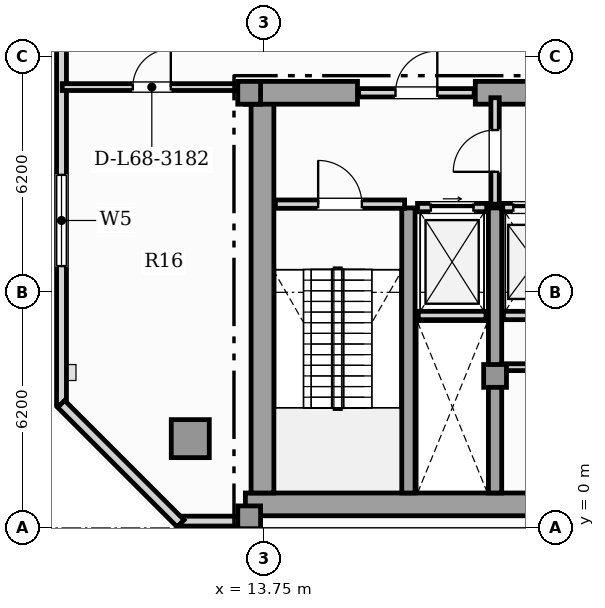
"""IFC4 building model, lengths in metres.
Left out: names, types, materials, properties, quantities, classifications, styles, units other than length and angle.
Written with IfcOpenShell. Run it as: python <this file> out.ifc"""

import sys

from ifc_helpers import new_model, si_unit, direction, frame, frame_2d, origin, origin_2d, place, context, subcontext, project, spatial, rectangle, hollow_rectangle, extrude, element, fill, save


model = new_model("IFC4")
c1 = context("Model", 3, precision=1e-05, world=origin(), true_north=direction((0.0, 1.0)))
c2 = subcontext(c1, "Body", "Model", "MODEL_VIEW")
j1 = project(units=[si_unit("LENGTHUNIT", "METRE"), si_unit("PLANEANGLEUNIT", "RADIAN")], contexts=[c1])
p1 = place(None, origin())
s1 = spatial("IfcSite", under=j1, at=p1, CompositionType="ELEMENT")
p2 = place(p1, origin())
s2 = spatial("IfcBuilding", under=s1, at=p2, CompositionType="ELEMENT")
p3 = place(p2, frame((0.0, 0.0, 276.0)))
s3 = spatial("IfcBuildingStorey", under=s2, at=p3, CompositionType="ELEMENT", Elevation=276.0)
p4 = place(p3, frame((13.25, 0.62, 0.0), z_axis=(0.0, 0.0, 1.0), x_axis=(1.0, 0.0, 0.0)))
e1 = element("IfcWall", 1, at=p4, inside=s3, PredefinedType="SHEAR", context=c2, shape_type="SweptSolid", body=[
    extrude(rectangle(XDim=31.0, YDim=0.6, at=frame_2d((15.5, 0.0))), origin(), (0.0, 0.0, 1.0), 4.85),
])
p5 = place(p3, frame((13.7, 0.92, 0.0), z_axis=(0.0, 0.0, 1.0), x_axis=(0.0, 1.0, 0.0)))
e2 = element("IfcWall", 2, at=p5, inside=s3, PredefinedType="SHEAR", context=c2, shape_type="SweptSolid", body=[
    extrude(rectangle(XDim=10.53, YDim=0.6, at=frame_2d((5.265, 0.0))), origin(), (0.0, 0.0, 1.0), 4.85),
])
p6 = place(p3, frame((13.25, 11.45, 0.0), z_axis=(0.0, 0.0, 1.0), x_axis=(1.0, 0.0, 0.0)))
e3 = element("IfcWall", 3, at=p6, inside=s3, PredefinedType="SHEAR", context=c2, shape_type="SweptSolid", body=[
    extrude(rectangle(XDim=2.95, YDim=0.6, at=frame_2d((1.475, 0.0))), origin(), (0.0, 0.0, 1.0), 4.85),
])
p7 = place(p3, frame((19.3, 11.45, 0.0), z_axis=(0.0, 0.0, 1.0), x_axis=(1.0, 0.0, 0.0)))
e4 = element("IfcWall", 4, at=p7, inside=s3, PredefinedType="SHEAR", context=c2, shape_type="SweptSolid", body=[
    extrude(rectangle(XDim=7.3, YDim=0.6, at=frame_2d((3.65, 0.0))), origin(), (0.0, 0.0, 1.0), 4.85),
])
for number, where, z_axis, x_axis in (
    (5, (17.54, 0.92, 0.0), (0.0, 0.0, 1.0), (0.0, 1.0, 0.0)),
    (6, (19.82, 0.92, 0.0), (0.0, 0.0, 1.0), (0.0, 1.0, 0.0)),
):
    element("IfcWall", number, at=place(p3, frame(where, z_axis=z_axis, x_axis=x_axis)), inside=s3, PredefinedType="SHEAR", context=c2, shape_type="SweptSolid", body=[
        extrude(rectangle(XDim=7.5, YDim=0.35, at=frame_2d((3.75, 0.0))), origin(), (0.0, 0.0, 1.0), 4.85),
    ])
for number, where, z_axis, x_axis in (
    (7, (13.35, 0.28, 0.0), (0.0, 0.0, 1.0), (1.0, 0.0, 0.0)),
    (8, (13.35, 11.45, 0.0), (0.0, 0.0, 1.0), (1.0, 0.0, 0.0)),
    (9, (19.82, 4.0, 0.0), (0.0, 0.0, 1.0), (1.0, 0.0, 0.0)),
):
    element("IfcColumn", number, at=place(p3, frame(where, z_axis=z_axis, x_axis=x_axis)), inside=s3, PredefinedType="COLUMN", context=c2, shape_type="SweptSolid", body=[
        extrude(rectangle(XDim=0.6, YDim=0.6, at=origin_2d()), origin(), (0.0, 0.0, 1.0), 5.05),
    ])
p8 = place(p3, frame((11.8, 2.35, 0.0), z_axis=(0.0, 0.0, 1.0), x_axis=(1.0, 0.0, 0.0)))
e10 = element("IfcColumn", 10, at=p8, inside=s3, PredefinedType="USERDEFINED", context=c2, shape_type="SweptSolid", body=[
    extrude(hollow_rectangle(XDim=1.0, YDim=1.0, WallThickness=0.06, at=origin_2d()), origin(), (0.0, 0.0, 1.0), 5.05),
])
p9 = place(p3, frame((11.522, 0.18, 0.0), z_axis=(0.0, 0.0, 1.0), x_axis=(1.0, 0.0, 0.0)))
e11 = element("IfcWall", 11, at=p9, inside=s3, PredefinedType="SOLIDWALL", context=c2, shape_type="SweptSolid", body=[
    extrude(rectangle(XDim=1.728, YDim=0.26, at=frame_2d((0.864, 0.0))), origin(), (0.0, 0.0, 1.0), 4.85),
])
p10 = place(p3, frame((8.412, 18.529, 0.0), z_axis=(0.0, 0.0, 1.0), x_axis=(0.0, -1.0, 0.0)))
e12 = element("IfcWall", 12, at=p10, inside=s3, PredefinedType="SOLIDWALL", context=c2, shape_type="SweptSolid", body=[
    extrude(rectangle(XDim=15.289, YDim=0.26, at=frame_2d((7.645, 0.0))), origin(), (0.0, 0.0, 1.0), 4.85),
])
p11 = place(p10, frame((9.239, 0.0, 0.85)))
e13 = element("IfcOpeningElement", 13, at=p11, cuts=e12, PredefinedType="OPENING", context=c2, shape_type="SweptSolid", body=[
    extrude(rectangle(XDim=2.4, YDim=2.0, at=frame_2d((1.2, 1.0))), frame((0.0, 0.14, 0.0), z_axis=(0.0, -1.0, 0.0), x_axis=(1.0, 0.0, 0.0)), (0.0, 0.0, 1.0), 0.28),
])
p12 = place(p3, frame((8.402, 3.264, 0.0), z_axis=(0.0, 0.0, 1.0), x_axis=(0.707106781187, -0.707106781187, 0.0)))
e14 = element("IfcWall", 14, at=p12, inside=s3, PredefinedType="SOLIDWALL", context=c2, shape_type="SweptSolid", body=[
    extrude(rectangle(XDim=4.446, YDim=0.26, at=frame_2d((2.223, 0.0))), origin(), (0.0, 0.0, 1.0), 4.85),
])
p13 = place(p3, frame((17.8, 5.59, 0.0), z_axis=(0.0, 0.0, 1.0), x_axis=(1.0, 0.0, 0.0)))
e15 = element("IfcWall", 15, at=p13, inside=s3, PredefinedType="SOLIDWALL", context=c2, shape_type="SweptSolid", body=[
    extrude(rectangle(XDim=1.78, YDim=0.22, at=frame_2d((0.89, 0.0))), origin(), (0.0, 0.0, 1.0), 4.85),
])
p14 = place(p3, frame((17.78, 8.43, 0.0), z_axis=(0.0, 0.0, 1.0), x_axis=(1.0, 0.0, 0.0)))
e16 = element("IfcWall", 16, at=p14, inside=s3, PredefinedType="SOLIDWALL", context=c2, shape_type="SweptSolid", body=[
    extrude(rectangle(XDim=1.82, YDim=0.22, at=frame_2d((0.91, 0.0))), origin(), (0.0, 0.0, 1.0), 4.85),
])
p15 = place(p14, frame((0.35, 0.0, 0.0)))
e17 = element("IfcOpeningElement", 17, at=p15, cuts=e16, PredefinedType="OPENING", context=c2, shape_type="SweptSolid", body=[
    extrude(rectangle(XDim=1.12, YDim=2.25, at=frame_2d((0.56, 1.125))), frame((0.0, 0.12, 0.0), z_axis=(0.0, -1.0, 0.0), x_axis=(1.0, 0.0, 0.0)), (0.0, 0.0, 1.0), 0.24),
])
p16 = place(p3, frame((20.04, 5.59, 0.0), z_axis=(0.0, 0.0, 1.0), x_axis=(1.0, 0.0, 0.0)))
e18 = element("IfcWall", 18, at=p16, inside=s3, PredefinedType="SOLIDWALL", context=c2, shape_type="SweptSolid", body=[
    extrude(rectangle(XDim=1.7, YDim=0.22, at=frame_2d((0.85, 0.0))), origin(), (0.0, 0.0, 1.0), 4.85),
])
p17 = place(p3, frame((20.02, 8.43, 0.0), z_axis=(0.0, 0.0, 1.0), x_axis=(1.0, 0.0, 0.0)))
e19 = element("IfcWall", 19, at=p17, inside=s3, PredefinedType="SOLIDWALL", context=c2, shape_type="SweptSolid", body=[
    extrude(rectangle(XDim=1.74, YDim=0.22, at=frame_2d((0.87, 0.0))), origin(), (0.0, 0.0, 1.0), 4.85),
])
p18 = place(p17, frame((0.28, 0.0, 0.0)))
e20 = element("IfcOpeningElement", 20, at=p18, cuts=e19, PredefinedType="OPENING", context=c2, shape_type="SweptSolid", body=[
    extrude(rectangle(XDim=1.18, YDim=2.2, at=frame_2d((0.59, 1.1))), frame((0.0, 0.12, 0.0), z_axis=(0.0, -1.0, 0.0), x_axis=(1.0, 0.0, 0.0)), (0.0, 0.0, 1.0), 0.24),
])
p19 = place(p3, frame((14.04, 8.52, 0.0), z_axis=(0.0, 0.0, 1.0), x_axis=(1.0, 0.0, 0.0)))
e21 = element("IfcWall", 21, at=p19, inside=s3, PredefinedType="SOLIDWALL", context=c2, shape_type="SweptSolid", body=[
    extrude(rectangle(XDim=3.4, YDim=0.22, at=frame_2d((1.7, 0.0))), origin(), (0.0, 0.0, 1.0), 4.85),
])
p20 = place(p19, frame((1.125, 0.0, 0.0)))
e22 = element("IfcOpeningElement", 22, at=p20, cuts=e21, PredefinedType="OPENING", context=c2, shape_type="SweptSolid", body=[
    extrude(rectangle(XDim=1.15, YDim=2.2, at=frame_2d((0.575, 1.1))), frame((0.0, 0.12, 0.0), z_axis=(0.0, -1.0, 0.0), x_axis=(1.0, 0.0, 0.0)), (0.0, 0.0, 1.0), 0.24),
])
p21 = place(p3, frame((19.82, 8.52, 0.0), z_axis=(0.0, 0.0, 1.0), x_axis=(0.0, 1.0, 0.0)))
e23 = element("IfcWall", 23, at=p21, inside=s3, PredefinedType="SOLIDWALL", context=c2, shape_type="SweptSolid", body=[
    extrude(rectangle(XDim=2.8, YDim=0.22, at=frame_2d((1.4, 0.0))), origin(), (0.0, 0.0, 1.0), 4.305),
])
p22 = place(p21, frame((0.85, 0.0, 0.0)))
e24 = element("IfcOpeningElement", 24, at=p22, cuts=e23, PredefinedType="OPENING", context=c2, shape_type="SweptSolid", body=[
    extrude(rectangle(XDim=1.1, YDim=2.2, at=frame_2d((0.55, 1.1))), frame((0.0, 0.12, 0.0), z_axis=(0.0, -1.0, 0.0), x_axis=(1.0, 0.0, 0.0)), (0.0, 0.0, 1.0), 0.24),
])
p23 = place(p3, frame((16.23, 11.45, 0.0), z_axis=(0.0, 0.0, 1.0), x_axis=(1.0, 0.0, 0.0)))
e25 = element("IfcWall", 25, at=p23, inside=s3, PredefinedType="SOLIDWALL", context=c2, shape_type="SweptSolid", body=[
    extrude(rectangle(XDim=3.04, YDim=0.22, at=frame_2d((1.52, 0.0))), origin(), (0.0, 0.0, 1.0), 4.85),
])
p24 = place(p23, frame((0.97, 0.0, 0.0)))
e26 = element("IfcOpeningElement", 26, at=p24, cuts=e25, PredefinedType="OPENING", context=c2, shape_type="SweptSolid", body=[
    extrude(rectangle(XDim=1.1, YDim=2.2, at=frame_2d((0.55, 1.1))), frame((0.0, 0.12, 0.0), z_axis=(0.0, -1.0, 0.0), x_axis=(1.0, 0.0, 0.0)), (0.0, 0.0, 1.0), 0.24),
])
p25 = place(p3, frame((19.98, 4.23, 0.0), z_axis=(0.0, 0.0, 1.0), x_axis=(1.0, 0.0, 0.0)))
e27 = element("IfcWall", 27, at=p25, inside=s3, PredefinedType="PARTITIONING", context=c2, shape_type="SweptSolid", body=[
    extrude(rectangle(XDim=5.32, YDim=0.18, at=frame_2d((2.66, 0.0))), origin(), (0.0, 0.0, 1.0), 4.85),
])
p26 = place(p3, frame((8.431, 11.6, 0.0), z_axis=(0.0, 0.0, 1.0), x_axis=(1.0, 0.0, 0.0)))
e28 = element("IfcWall", 28, at=p26, inside=s3, PredefinedType="PARTITIONING", context=c2, shape_type="SweptSolid", body=[
    extrude(rectangle(XDim=4.714, YDim=0.18, at=frame_2d((2.357, 0.0))), origin(), (0.0, 0.0, 1.0), 4.85),
])
p27 = place(p26, frame((1.857, 0.0, 0.0)))
e29 = element("IfcOpeningElement", 29, at=p27, cuts=e28, PredefinedType="OPENING", context=c2, shape_type="SweptSolid", body=[
    extrude(rectangle(XDim=1.0, YDim=2.15, at=frame_2d((0.5, 1.075))), frame((0.0, 0.1, 0.0), z_axis=(0.0, -1.0, 0.0), x_axis=(1.0, 0.0, 0.0)), (0.0, 0.0, 1.0), 0.2),
])
p28 = place(p11, origin())
e30 = element("IfcWindow", 30, at=p28, inside=s3, PartitioningType="SINGLE_PANEL", PredefinedType="WINDOW", context=c2, shape_type="SweptSolid", body=[
    extrude(rectangle(XDim=2.4, YDim=2.0, at=frame_2d((1.2, 1.0))), frame((0.0, 0.03, 0.0), z_axis=(0.0, -1.0, 0.0), x_axis=(1.0, 0.0, 0.0)), (0.0, 0.0, 1.0), 0.06),
])
fill(e13, e30)
p29 = place(p15, origin())
e31 = element("IfcDoor", 31, at=p29, inside=s3, OperationType="SLIDING_TO_RIGHT", PredefinedType="DOOR", context=c2, shape_type="SweptSolid", body=[
    extrude(rectangle(XDim=1.12, YDim=2.25, at=frame_2d((0.56, 1.125))), frame((0.0, 0.025, 0.0), z_axis=(0.0, -1.0, 0.0), x_axis=(1.0, 0.0, 0.0)), (0.0, 0.0, 1.0), 0.05),
])
fill(e17, e31)
p30 = place(p18, origin())
e32 = element("IfcDoor", 32, at=p30, inside=s3, OperationType="SLIDING_TO_LEFT", PredefinedType="DOOR", context=c2, shape_type="SweptSolid", body=[
    extrude(rectangle(XDim=1.18, YDim=2.2, at=frame_2d((0.59, 1.1))), frame((0.0, 0.025, 0.0), z_axis=(0.0, -1.0, 0.0), x_axis=(1.0, 0.0, 0.0)), (0.0, 0.0, 1.0), 0.05),
])
fill(e20, e32)
p31 = place(p20, origin())
e33 = element("IfcDoor", 33, at=p31, inside=s3, OperationType="SINGLE_SWING_LEFT", PredefinedType="DOOR", context=c2, shape_type="SweptSolid", body=[
    extrude(rectangle(XDim=1.15, YDim=2.2, at=frame_2d((0.575, 1.1))), frame((0.0, 0.025, 0.0), z_axis=(0.0, -1.0, 0.0), x_axis=(1.0, 0.0, 0.0)), (0.0, 0.0, 1.0), 0.05),
])
fill(e22, e33)
p32 = place(p22, origin())
e34 = element("IfcDoor", 34, at=p32, inside=s3, OperationType="SINGLE_SWING_LEFT", PredefinedType="DOOR", context=c2, shape_type="SweptSolid", body=[
    extrude(rectangle(XDim=1.1, YDim=2.2, at=frame_2d((0.55, 1.1))), frame((0.0, 0.025, 0.0), z_axis=(0.0, -1.0, 0.0), x_axis=(1.0, 0.0, 0.0)), (0.0, 0.0, 1.0), 0.05),
])
fill(e24, e34)
p33 = place(p24, origin())
e35 = element("IfcDoor", 35, at=p33, inside=s3, OperationType="SINGLE_SWING_RIGHT", PredefinedType="DOOR", context=c2, shape_type="SweptSolid", body=[
    extrude(rectangle(XDim=1.1, YDim=2.2, at=frame_2d((0.55, 1.1))), frame((0.0, 0.025, 0.0), z_axis=(0.0, -1.0, 0.0), x_axis=(1.0, 0.0, 0.0)), (0.0, 0.0, 1.0), 0.05),
])
fill(e26, e35)
p34 = place(p27, origin())
e36 = element("IfcDoor", 36, at=p34, inside=s3, OperationType="SINGLE_SWING_RIGHT", PredefinedType="DOOR", context=c2, shape_type="SweptSolid", body=[
    extrude(rectangle(XDim=1.0, YDim=2.15, at=frame_2d((0.5, 1.075))), frame((0.0, 0.025, 0.0), z_axis=(0.0, -1.0, 0.0), x_axis=(1.0, 0.0, 0.0)), (0.0, 0.0, 1.0), 0.05),
])
fill(e29, e36)
save(model, sys.argv[1])
